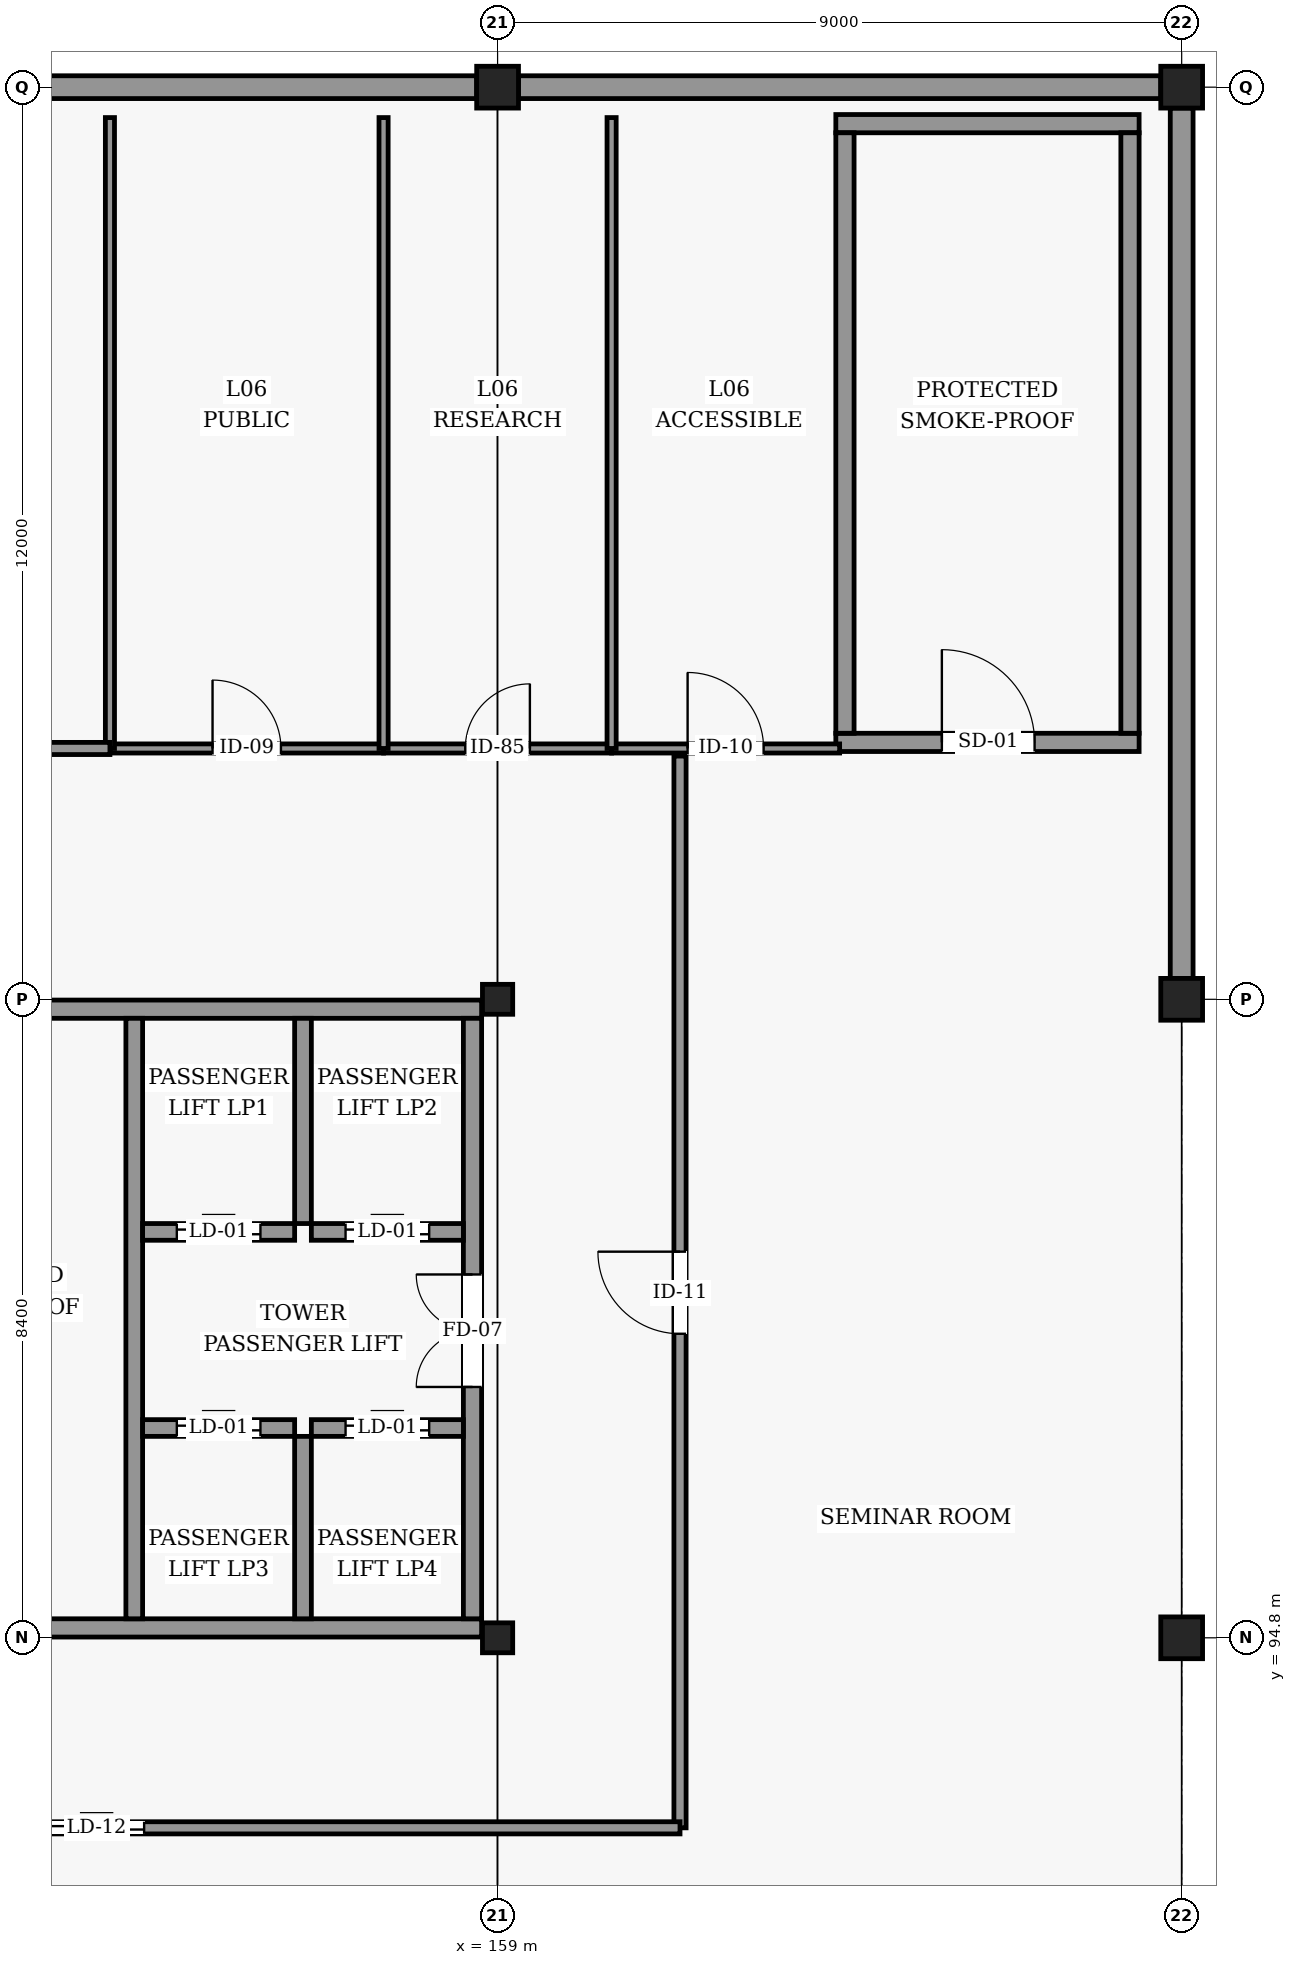
"""IFC4 building model, lengths in metres.
Left out: names, types, materials, properties, quantities, classifications, styles, units other than length and angle.
Written with IfcOpenShell. Run it as: python <this file> out.ifc"""

import sys

from ifc_helpers import new_model, si_unit, direction, frame, frame_2d, origin, origin_2d, place, context, subcontext, project, spatial, rectangle, hollow_rectangle, i_section, extrude, element, fill, save


model = new_model("IFC4")
c1 = context("Model", 3, precision=1e-05, world=origin(), true_north=direction((0.0, 1.0)))
c2 = subcontext(c1, "Body", "Model", "MODEL_VIEW")
j1 = project(units=[si_unit("LENGTHUNIT", "METRE"), si_unit("PLANEANGLEUNIT", "RADIAN")], contexts=[c1])
p1 = place(None, origin())
s1 = spatial("IfcSite", under=j1, at=p1, CompositionType="ELEMENT")
p2 = place(p1, origin())
s2 = spatial("IfcBuilding", under=s1, at=p2, CompositionType="ELEMENT")
p3 = place(p2, frame((0.0, 0.0, 24.6)))
s3 = spatial("IfcBuildingStorey", under=s2, at=p3, CompositionType="ELEMENT", Elevation=24.6)
for number, where, z_axis, x_axis in (
    (1, (159.0, 94.8, 0.0), (0.0, 0.0, 1.0), (1.0, 0.0, 0.0)),
    (2, (159.0, 103.2, 0.0), (0.0, 0.0, 1.0), (1.0, 0.0, 0.0)),
):
    element("IfcColumn", number, at=place(p3, frame(where, z_axis=z_axis, x_axis=x_axis)), inside=s3, PredefinedType="COLUMN", context=c2, shape_type="SweptSolid", body=[
        extrude(i_section(OverallWidth=0.398, OverallDepth=0.394, WebThickness=0.011, FlangeThickness=0.018, FilletRadius=0.022, at=origin_2d()), origin(), (0.0, 0.0, 1.0), 3.6),
    ])
for number, where, z_axis, x_axis in (
    (3, (159.0, 115.2, 0.0), (0.0, 0.0, 1.0), (1.0, 0.0, 0.0)),
    (4, (168.0, 94.8, 0.0), (0.0, 0.0, 1.0), (1.0, 0.0, 0.0)),
    (5, (168.0, 103.2, 0.0), (0.0, 0.0, 1.0), (1.0, 0.0, 0.0)),
    (6, (168.0, 115.2, 0.0), (0.0, 0.0, 1.0), (1.0, 0.0, 0.0)),
):
    element("IfcColumn", number, at=place(p3, frame(where, z_axis=z_axis, x_axis=x_axis)), inside=s3, PredefinedType="COLUMN", context=c2, shape_type="SweptSolid", body=[
        extrude(hollow_rectangle(XDim=0.55, YDim=0.55, WallThickness=0.022, InnerFilletRadius=0.022, OuterFilletRadius=0.044, at=origin_2d()), origin(), (0.0, 0.0, 1.0), 3.6),
    ])
p4 = place(p3, frame((168.0, 103.475, 0.0), z_axis=(0.0, 0.0, 1.0), x_axis=(0.0, 1.0, 0.0)))
e7 = element("IfcWall", 7, at=p4, inside=s3, PredefinedType="SOLIDWALL", context=c2, shape_type="SweptSolid", body=[
    extrude(rectangle(XDim=11.45, YDim=0.3, at=frame_2d((5.725, 0.0))), origin(), (0.0, 0.0, 1.0), 2.553),
])
for number, where, z_axis, x_axis in (
    (8, (167.725, 115.2, 0.0), (0.0, 0.0, 1.0), (-1.0, 0.0, 0.0)),
    (9, (158.725, 115.2, 0.0), (0.0, 0.0, 1.0), (-1.0, 0.0, 0.0)),
):
    element("IfcWall", number, at=place(p3, frame(where, z_axis=z_axis, x_axis=x_axis)), inside=s3, PredefinedType="SOLIDWALL", context=c2, shape_type="SweptSolid", body=[
        extrude(rectangle(XDim=8.45, YDim=0.3, at=frame_2d((4.225, 0.0))), origin(), (0.0, 0.0, 1.0), 2.553),
    ])
p5 = place(p3, frame((150.02, 94.93, 0.0), z_axis=(0.0, 0.0, 1.0), x_axis=(1.0, 0.0, 0.0)))
e10 = element("IfcWall", 10, at=p5, inside=s3, PredefinedType="SHEAR", context=c2, shape_type="SweptSolid", body=[
    extrude(rectangle(XDim=8.77, YDim=0.24, at=frame_2d((4.385, 0.0))), origin(), (0.0, 0.0, 1.0), 3.345),
])
p6 = place(p5, frame((1.79, 0.0, 0.0)))
e11 = element("IfcOpeningElement", 11, at=p6, cuts=e10, PredefinedType="OPENING", context=c2, shape_type="SweptSolid", body=[
    extrude(rectangle(XDim=1.22, YDim=2.18, at=frame_2d((0.61, 1.09))), frame((0.0, 0.13, 0.0), z_axis=(0.0, -1.0, 0.0), x_axis=(1.0, 0.0, 0.0)), (0.0, 0.0, 1.0), 0.26),
])
p7 = place(p3, frame((150.02, 103.07, 0.0), z_axis=(0.0, 0.0, 1.0), x_axis=(1.0, 0.0, 0.0)))
e12 = element("IfcWall", 12, at=p7, inside=s3, PredefinedType="SHEAR", context=c2, shape_type="SweptSolid", body=[
    extrude(rectangle(XDim=8.77, YDim=0.24, at=frame_2d((4.385, 0.0))), origin(), (0.0, 0.0, 1.0), 3.345),
])
p8 = place(p3, frame((154.22, 95.05, 0.0), z_axis=(0.0, 0.0, 1.0), x_axis=(0.0, 1.0, 0.0)))
e13 = element("IfcWall", 13, at=p8, inside=s3, PredefinedType="SHEAR", context=c2, shape_type="SweptSolid", body=[
    extrude(rectangle(XDim=7.9, YDim=0.22, at=frame_2d((3.95, 0.0))), origin(), (0.0, 0.0, 1.0), 3.345),
])
p9 = place(p3, frame((158.67, 95.05, 0.0), z_axis=(0.0, 0.0, 1.0), x_axis=(0.0, 1.0, 0.0)))
e14 = element("IfcWall", 14, at=p9, inside=s3, PredefinedType="SHEAR", context=c2, shape_type="SweptSolid", body=[
    extrude(rectangle(XDim=7.9, YDim=0.24, at=frame_2d((3.95, 0.0))), origin(), (0.0, 0.0, 1.0), 3.345),
])
p10 = place(p9, frame((3.05, 0.0, 0.0)))
e15 = element("IfcOpeningElement", 15, at=p10, cuts=e14, PredefinedType="OPENING", context=c2, shape_type="SweptSolid", body=[
    extrude(rectangle(XDim=1.48, YDim=2.22, at=frame_2d((0.74, 1.11))), frame((0.0, 0.13, 0.0), z_axis=(0.0, -1.0, 0.0), x_axis=(1.0, 0.0, 0.0)), (0.0, 0.0, 1.0), 0.26),
])
p11 = place(p3, frame((156.44, 100.25, 0.0), z_axis=(0.0, 0.0, 1.0), x_axis=(0.0, 1.0, 0.0)))
e16 = element("IfcWall", 16, at=p11, inside=s3, PredefinedType="SHEAR", context=c2, shape_type="SweptSolid", body=[
    extrude(rectangle(XDim=2.7, YDim=0.22, at=frame_2d((1.35, 0.0))), origin(), (0.0, 0.0, 1.0), 3.345),
])
p12 = place(p3, frame((154.33, 100.14, 0.0), z_axis=(0.0, 0.0, 1.0), x_axis=(1.0, 0.0, 0.0)))
e17 = element("IfcWall", 17, at=p12, inside=s3, PredefinedType="SHEAR", context=c2, shape_type="SweptSolid", body=[
    extrude(rectangle(XDim=2.0, YDim=0.22, at=frame_2d((1.0, 0.0))), origin(), (0.0, 0.0, 1.0), 3.345),
])
p13 = place(p12, frame((0.45, 0.0, 0.0)))
e18 = element("IfcOpeningElement", 18, at=p13, cuts=e17, PredefinedType="OPENING", context=c2, shape_type="SweptSolid", body=[
    extrude(rectangle(XDim=1.1, YDim=2.15, at=frame_2d((0.55, 1.075))), frame((0.0, 0.12, 0.0), z_axis=(0.0, -1.0, 0.0), x_axis=(1.0, 0.0, 0.0)), (0.0, 0.0, 1.0), 0.24),
])
p14 = place(p3, frame((156.55, 100.14, 0.0), z_axis=(0.0, 0.0, 1.0), x_axis=(1.0, 0.0, 0.0)))
e19 = element("IfcWall", 19, at=p14, inside=s3, PredefinedType="SHEAR", context=c2, shape_type="SweptSolid", body=[
    extrude(rectangle(XDim=2.0, YDim=0.22, at=frame_2d((1.0, 0.0))), origin(), (0.0, 0.0, 1.0), 3.345),
])
p15 = place(p14, frame((0.45, 0.0, 0.0)))
e20 = element("IfcOpeningElement", 20, at=p15, cuts=e19, PredefinedType="OPENING", context=c2, shape_type="SweptSolid", body=[
    extrude(rectangle(XDim=1.1, YDim=2.15, at=frame_2d((0.55, 1.075))), frame((0.0, 0.12, 0.0), z_axis=(0.0, -1.0, 0.0), x_axis=(1.0, 0.0, 0.0)), (0.0, 0.0, 1.0), 0.24),
])
p16 = place(p3, frame((156.44, 95.05, 0.0), z_axis=(0.0, 0.0, 1.0), x_axis=(0.0, 1.0, 0.0)))
e21 = element("IfcWall", 21, at=p16, inside=s3, PredefinedType="SHEAR", context=c2, shape_type="SweptSolid", body=[
    extrude(rectangle(XDim=2.4, YDim=0.22, at=frame_2d((1.2, 0.0))), origin(), (0.0, 0.0, 1.0), 3.345),
])
p17 = place(p3, frame((154.33, 97.56, 0.0), z_axis=(0.0, 0.0, 1.0), x_axis=(1.0, 0.0, 0.0)))
e22 = element("IfcWall", 22, at=p17, inside=s3, PredefinedType="SHEAR", context=c2, shape_type="SweptSolid", body=[
    extrude(rectangle(XDim=2.0, YDim=0.22, at=frame_2d((1.0, 0.0))), origin(), (0.0, 0.0, 1.0), 3.345),
])
p18 = place(p17, frame((0.45, 0.0, 0.0)))
e23 = element("IfcOpeningElement", 23, at=p18, cuts=e22, PredefinedType="OPENING", context=c2, shape_type="SweptSolid", body=[
    extrude(rectangle(XDim=1.1, YDim=2.15, at=frame_2d((0.55, 1.075))), frame((0.0, 0.12, 0.0), z_axis=(0.0, -1.0, 0.0), x_axis=(1.0, 0.0, 0.0)), (0.0, 0.0, 1.0), 0.24),
])
p19 = place(p3, frame((156.55, 97.56, 0.0), z_axis=(0.0, 0.0, 1.0), x_axis=(1.0, 0.0, 0.0)))
e24 = element("IfcWall", 24, at=p19, inside=s3, PredefinedType="SHEAR", context=c2, shape_type="SweptSolid", body=[
    extrude(rectangle(XDim=2.0, YDim=0.22, at=frame_2d((1.0, 0.0))), origin(), (0.0, 0.0, 1.0), 3.345),
])
p20 = place(p19, frame((0.45, 0.0, 0.0)))
e25 = element("IfcOpeningElement", 25, at=p20, cuts=e24, PredefinedType="OPENING", context=c2, shape_type="SweptSolid", body=[
    extrude(rectangle(XDim=1.1, YDim=2.15, at=frame_2d((0.55, 1.075))), frame((0.0, 0.12, 0.0), z_axis=(0.0, -1.0, 0.0), x_axis=(1.0, 0.0, 0.0)), (0.0, 0.0, 1.0), 0.24),
])
p21 = place(p3, frame((163.45, 106.58, 0.0), z_axis=(0.0, 0.0, 1.0), x_axis=(1.0, 0.0, 0.0)))
e26 = element("IfcWall", 26, at=p21, inside=s3, PredefinedType="SHEAR", context=c2, shape_type="SweptSolid", body=[
    extrude(rectangle(XDim=3.99, YDim=0.24, at=frame_2d((1.995, 0.0))), origin(), (0.0, 0.0, 1.0), 3.345),
])
p22 = place(p21, frame((1.395, 0.0, 0.0)))
e27 = element("IfcOpeningElement", 27, at=p22, cuts=e26, PredefinedType="OPENING", context=c2, shape_type="SweptSolid", body=[
    extrude(rectangle(XDim=1.22, YDim=2.18, at=frame_2d((0.61, 1.09))), frame((0.0, 0.13, 0.0), z_axis=(0.0, -1.0, 0.0), x_axis=(1.0, 0.0, 0.0)), (0.0, 0.0, 1.0), 0.26),
])
p23 = place(p3, frame((163.45, 114.72, 0.0), z_axis=(0.0, 0.0, 1.0), x_axis=(1.0, 0.0, 0.0)))
e28 = element("IfcWall", 28, at=p23, inside=s3, PredefinedType="SHEAR", context=c2, shape_type="SweptSolid", body=[
    extrude(rectangle(XDim=3.99, YDim=0.24, at=frame_2d((1.995, 0.0))), origin(), (0.0, 0.0, 1.0), 3.345),
])
for number, where, z_axis, x_axis in (
    (29, (163.57, 106.7, 0.0), (0.0, 0.0, 1.0), (0.0, 1.0, 0.0)),
    (30, (167.32, 106.7, 0.0), (0.0, 0.0, 1.0), (0.0, 1.0, 0.0)),
):
    element("IfcWall", number, at=place(p3, frame(where, z_axis=z_axis, x_axis=x_axis)), inside=s3, PredefinedType="SHEAR", context=c2, shape_type="SweptSolid", body=[
        extrude(rectangle(XDim=7.9, YDim=0.24, at=frame_2d((3.95, 0.0))), origin(), (0.0, 0.0, 1.0), 3.345),
    ])
p24 = place(p3, frame((153.9, 106.5, 0.0), z_axis=(0.0, 0.0, 1.0), x_axis=(1.0, 0.0, 0.0)))
e31 = element("IfcWall", 31, at=p24, inside=s3, PredefinedType="PARTITIONING", context=c2, shape_type="SweptSolid", body=[
    extrude(rectangle(XDim=3.6, YDim=0.12, at=frame_2d((1.8, 0.0))), origin(), (0.0, 0.0, 1.0), 3.345),
])
p25 = place(p24, frame((1.35, 0.0, 0.0)))
e32 = element("IfcOpeningElement", 32, at=p25, cuts=e31, PredefinedType="OPENING", context=c2, shape_type="SweptSolid", body=[
    extrude(rectangle(XDim=0.9, YDim=2.1, at=frame_2d((0.45, 1.05))), frame((0.0, 0.07, 0.0), z_axis=(0.0, -1.0, 0.0), x_axis=(1.0, 0.0, 0.0)), (0.0, 0.0, 1.0), 0.14),
])
p26 = place(p3, frame((157.5, 106.5, 0.0), z_axis=(0.0, 0.0, 1.0), x_axis=(1.0, 0.0, 0.0)))
e33 = element("IfcWall", 33, at=p26, inside=s3, PredefinedType="PARTITIONING", context=c2, shape_type="SweptSolid", body=[
    extrude(rectangle(XDim=3.0, YDim=0.12, at=frame_2d((1.5, 0.0))), origin(), (0.0, 0.0, 1.0), 2.595),
])
p27 = place(p26, frame((1.075, 0.0, 0.0)))
e34 = element("IfcOpeningElement", 34, at=p27, cuts=e33, PredefinedType="OPENING", context=c2, shape_type="SweptSolid", body=[
    extrude(rectangle(XDim=0.85, YDim=2.1, at=frame_2d((0.425, 1.05))), frame((0.0, 0.07, 0.0), z_axis=(0.0, -1.0, 0.0), x_axis=(1.0, 0.0, 0.0)), (0.0, 0.0, 1.0), 0.14),
])
p28 = place(p3, frame((160.5, 106.5, 0.0), z_axis=(0.0, 0.0, 1.0), x_axis=(1.0, 0.0, 0.0)))
e35 = element("IfcWall", 35, at=p28, inside=s3, PredefinedType="PARTITIONING", context=c2, shape_type="SweptSolid", body=[
    extrude(rectangle(XDim=3.0, YDim=0.12, at=frame_2d((1.5, 0.0))), origin(), (0.0, 0.0, 1.0), 3.345),
])
p29 = place(p28, frame((1.0, 0.0, 0.0)))
e36 = element("IfcOpeningElement", 36, at=p29, cuts=e35, PredefinedType="OPENING", context=c2, shape_type="SweptSolid", body=[
    extrude(rectangle(XDim=1.0, YDim=2.1, at=frame_2d((0.5, 1.05))), frame((0.0, 0.07, 0.0), z_axis=(0.0, -1.0, 0.0), x_axis=(1.0, 0.0, 0.0)), (0.0, 0.0, 1.0), 0.14),
])
for number, where, z_axis, x_axis in (
    (37, (153.9, 106.5, 0.0), (0.0, 0.0, 1.0), (0.0, 1.0, 0.0)),
    (38, (157.5, 106.5, 0.0), (0.0, 0.0, 1.0), (0.0, 1.0, 0.0)),
):
    element("IfcWall", number, at=place(p3, frame(where, z_axis=z_axis, x_axis=x_axis)), inside=s3, PredefinedType="PARTITIONING", context=c2, shape_type="SweptSolid", body=[
        extrude(rectangle(XDim=8.3, YDim=0.12, at=frame_2d((4.15, 0.0))), origin(), (0.0, 0.0, 1.0), 2.945),
    ])
p30 = place(p3, frame((160.5, 106.5, 0.0), z_axis=(0.0, 0.0, 1.0), x_axis=(0.0, 1.0, 0.0)))
e39 = element("IfcWall", 39, at=p30, inside=s3, PredefinedType="PARTITIONING", context=c2, shape_type="SweptSolid", body=[
    extrude(rectangle(XDim=8.3, YDim=0.12, at=frame_2d((4.15, 0.0))), origin(), (0.0, 0.0, 1.0), 3.345),
])
p31 = place(p3, frame((161.4, 92.3, 0.0), z_axis=(0.0, 0.0, 1.0), x_axis=(0.0, 1.0, 0.0)))
e40 = element("IfcWall", 40, at=p31, inside=s3, PredefinedType="PARTITIONING", context=c2, shape_type="SweptSolid", body=[
    extrude(rectangle(XDim=14.1, YDim=0.16, at=frame_2d((7.05, 0.0))), origin(), (0.0, 0.0, 1.0), 2.745),
])
p32 = place(p31, frame((6.5, 0.0, 0.0)))
e41 = element("IfcOpeningElement", 41, at=p32, cuts=e40, PredefinedType="OPENING", context=c2, shape_type="SweptSolid", body=[
    extrude(rectangle(XDim=1.08, YDim=2.08, at=frame_2d((0.54, 1.04))), frame((0.0, 0.09, 0.0), z_axis=(0.0, -1.0, 0.0), x_axis=(1.0, 0.0, 0.0)), (0.0, 0.0, 1.0), 0.18),
])
p33 = place(p3, frame((146.0, 92.3, 0.0), z_axis=(0.0, 0.0, 1.0), x_axis=(1.0, 0.0, 0.0)))
e42 = element("IfcWall", 42, at=p33, inside=s3, PredefinedType="PARTITIONING", context=c2, shape_type="SweptSolid", body=[
    extrude(rectangle(XDim=15.4, YDim=0.16, at=frame_2d((7.7, 0.0))), origin(), (0.0, 0.0, 1.0), 2.845),
])
p34 = place(p33, frame((7.1, 0.0, 0.0)))
e43 = element("IfcOpeningElement", 43, at=p34, cuts=e42, PredefinedType="OPENING", context=c2, shape_type="SweptSolid", body=[
    extrude(rectangle(XDim=1.25, YDim=2.12, at=frame_2d((0.625, 1.06))), frame((0.0, 0.09, 0.0), z_axis=(0.0, -1.0, 0.0), x_axis=(1.0, 0.0, 0.0)), (0.0, 0.0, 1.0), 0.18),
])
p35 = place(p3, frame((142.1, 106.5, 0.0), z_axis=(0.0, 0.0, 1.0), x_axis=(1.0, 0.0, 0.0)))
e44 = element("IfcWall", 44, at=p35, inside=s3, PredefinedType="PARTITIONING", context=c2, shape_type="SweptSolid", body=[
    extrude(rectangle(XDim=11.8, YDim=0.16, at=frame_2d((5.9, 0.0))), origin(), (0.0, 0.0, 1.0), 2.595),
])
p36 = place(p35, frame((5.3, 0.0, 0.0)))
e45 = element("IfcOpeningElement", 45, at=p36, cuts=e44, PredefinedType="OPENING", context=c2, shape_type="SweptSolid", body=[
    extrude(rectangle(XDim=1.25, YDim=2.12, at=frame_2d((0.625, 1.06))), frame((0.0, 0.09, 0.0), z_axis=(0.0, -1.0, 0.0), x_axis=(1.0, 0.0, 0.0)), (0.0, 0.0, 1.0), 0.18),
])
p37 = place(p10, origin())
e46 = element("IfcDoor", 46, at=p37, inside=s3, OperationType="DOUBLE_DOOR_SINGLE_SWING", PredefinedType="DOOR", context=c2, shape_type="SweptSolid", body=[
    extrude(rectangle(XDim=1.48, YDim=2.22, at=frame_2d((0.74, 1.11))), frame((0.0, 0.025, 0.0), z_axis=(0.0, -1.0, 0.0), x_axis=(1.0, 0.0, 0.0)), (0.0, 0.0, 1.0), 0.05),
])
fill(e15, e46)
p38 = place(p13, origin())
e47 = element("IfcDoor", 47, at=p38, inside=s3, OperationType="SLIDING_TO_LEFT", PredefinedType="DOOR", context=c2, shape_type="SweptSolid", body=[
    extrude(rectangle(XDim=1.1, YDim=2.15, at=frame_2d((0.55, 1.075))), frame((0.0, 0.025, 0.0), z_axis=(0.0, -1.0, 0.0), x_axis=(1.0, 0.0, 0.0)), (0.0, 0.0, 1.0), 0.05),
])
fill(e18, e47)
p39 = place(p15, origin())
e48 = element("IfcDoor", 48, at=p39, inside=s3, OperationType="SLIDING_TO_LEFT", PredefinedType="DOOR", context=c2, shape_type="SweptSolid", body=[
    extrude(rectangle(XDim=1.1, YDim=2.15, at=frame_2d((0.55, 1.075))), frame((0.0, 0.025, 0.0), z_axis=(0.0, -1.0, 0.0), x_axis=(1.0, 0.0, 0.0)), (0.0, 0.0, 1.0), 0.05),
])
fill(e20, e48)
p40 = place(p18, origin())
e49 = element("IfcDoor", 49, at=p40, inside=s3, OperationType="SLIDING_TO_LEFT", PredefinedType="DOOR", context=c2, shape_type="SweptSolid", body=[
    extrude(rectangle(XDim=1.1, YDim=2.15, at=frame_2d((0.55, 1.075))), frame((0.0, 0.025, 0.0), z_axis=(0.0, -1.0, 0.0), x_axis=(1.0, 0.0, 0.0)), (0.0, 0.0, 1.0), 0.05),
])
fill(e23, e49)
p41 = place(p20, origin())
e50 = element("IfcDoor", 50, at=p41, inside=s3, OperationType="SLIDING_TO_LEFT", PredefinedType="DOOR", context=c2, shape_type="SweptSolid", body=[
    extrude(rectangle(XDim=1.1, YDim=2.15, at=frame_2d((0.55, 1.075))), frame((0.0, 0.025, 0.0), z_axis=(0.0, -1.0, 0.0), x_axis=(1.0, 0.0, 0.0)), (0.0, 0.0, 1.0), 0.05),
])
fill(e25, e50)
p42 = place(p22, origin())
e51 = element("IfcDoor", 51, at=p42, inside=s3, OperationType="SINGLE_SWING_LEFT", PredefinedType="DOOR", context=c2, shape_type="SweptSolid", body=[
    extrude(rectangle(XDim=1.22, YDim=2.18, at=frame_2d((0.61, 1.09))), frame((0.0, 0.025, 0.0), z_axis=(0.0, -1.0, 0.0), x_axis=(1.0, 0.0, 0.0)), (0.0, 0.0, 1.0), 0.05),
])
fill(e27, e51)
p43 = place(p25, origin())
e52 = element("IfcDoor", 52, at=p43, inside=s3, OperationType="SINGLE_SWING_LEFT", PredefinedType="DOOR", context=c2, shape_type="SweptSolid", body=[
    extrude(rectangle(XDim=0.9, YDim=2.1, at=frame_2d((0.45, 1.05))), frame((0.0, 0.025, 0.0), z_axis=(0.0, -1.0, 0.0), x_axis=(1.0, 0.0, 0.0)), (0.0, 0.0, 1.0), 0.05),
])
fill(e32, e52)
p44 = place(p27, origin())
e53 = element("IfcDoor", 53, at=p44, inside=s3, OperationType="SINGLE_SWING_RIGHT", PredefinedType="DOOR", context=c2, shape_type="SweptSolid", body=[
    extrude(rectangle(XDim=0.85, YDim=2.1, at=frame_2d((0.425, 1.05))), frame((0.0, 0.025, 0.0), z_axis=(0.0, -1.0, 0.0), x_axis=(1.0, 0.0, 0.0)), (0.0, 0.0, 1.0), 0.05),
])
fill(e34, e53)
p45 = place(p29, origin())
e54 = element("IfcDoor", 54, at=p45, inside=s3, OperationType="SINGLE_SWING_LEFT", PredefinedType="DOOR", context=c2, shape_type="SweptSolid", body=[
    extrude(rectangle(XDim=1.0, YDim=2.1, at=frame_2d((0.5, 1.05))), frame((0.0, 0.025, 0.0), z_axis=(0.0, -1.0, 0.0), x_axis=(1.0, 0.0, 0.0)), (0.0, 0.0, 1.0), 0.05),
])
fill(e36, e54)
p46 = place(p32, origin())
e55 = element("IfcDoor", 55, at=p46, inside=s3, OperationType="SINGLE_SWING_RIGHT", PredefinedType="DOOR", context=c2, shape_type="SweptSolid", body=[
    extrude(rectangle(XDim=1.08, YDim=2.08, at=frame_2d((0.54, 1.04))), frame((0.0, 0.025, 0.0), z_axis=(0.0, -1.0, 0.0), x_axis=(1.0, 0.0, 0.0)), (0.0, 0.0, 1.0), 0.05),
])
fill(e41, e55)
p47 = place(p34, origin())
e56 = element("IfcDoor", 56, at=p47, inside=s3, OperationType="SINGLE_SWING_LEFT", PredefinedType="DOOR", context=c2, shape_type="SweptSolid", body=[
    extrude(rectangle(XDim=1.25, YDim=2.12, at=frame_2d((0.625, 1.06))), frame((0.0, 0.025, 0.0), z_axis=(0.0, -1.0, 0.0), x_axis=(1.0, 0.0, 0.0)), (0.0, 0.0, 1.0), 0.05),
])
fill(e43, e56)
save(model, sys.argv[1])
